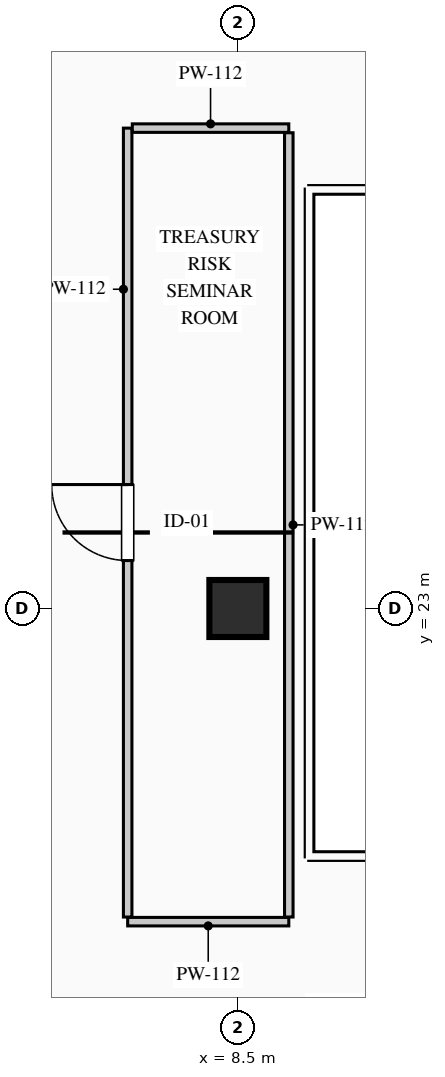
"""IFC4 building model, lengths in metres.
Left out: names, types, materials, properties, quantities, classifications, styles, units other than length and angle.
Written with IfcOpenShell. Run it as: python <this file> out.ifc"""

import sys

from ifc_helpers import new_model, si_unit, direction, frame, frame_2d, origin, origin_2d, place, context, subcontext, project, spatial, rectangle, extrude, element, fill, save


model = new_model("IFC4")
c1 = context("Model", 3, precision=1e-05, world=origin(), true_north=direction((0.0, 1.0)))
c2 = subcontext(c1, "Body", "Model", "MODEL_VIEW")
j1 = project(units=[si_unit("LENGTHUNIT", "METRE"), si_unit("PLANEANGLEUNIT", "RADIAN")], contexts=[c1])
p1 = place(None, origin())
s1 = spatial("IfcSite", under=j1, at=p1, CompositionType="ELEMENT")
p2 = place(p1, origin())
s2 = spatial("IfcBuilding", under=s1, at=p2, CompositionType="ELEMENT")
p3 = place(p2, frame((0.0, 0.0, 296.2)))
s3 = spatial("IfcBuildingStorey", under=s2, at=p3, CompositionType="ELEMENT", Elevation=296.2)
p4 = place(p3, frame((8.5, 23.0, 0.0), z_axis=(0.0, 0.0, 1.0), x_axis=(1.0, 0.0, 0.0)))
e1 = element("IfcColumn", 1, at=p4, inside=s3, PredefinedType="COLUMN", context=c2, shape_type="SweptSolid", body=[
    extrude(rectangle(XDim=0.75, YDim=0.75, at=origin_2d()), origin(), (0.0, 0.0, 1.0), 3.95),
])
p5 = place(p3, frame((9.17, 18.88, 0.0), z_axis=(0.0, 0.0, 1.0), x_axis=(-1.0, 0.0, 0.0)))
e2 = element("IfcWall", 2, at=p5, inside=s3, PredefinedType="PARTITIONING", context=c2, shape_type="SweptSolid", body=[
    extrude(rectangle(XDim=2.12, YDim=0.112, at=frame_2d((1.06, 0.0))), origin(), (0.0, 0.0, 1.0), 3.7),
])
p6 = place(p3, frame((7.05, 18.941, 0.0), z_axis=(0.0, 0.0, 1.0), x_axis=(0.0, 1.0, 0.0)))
e3 = element("IfcWall", 3, at=p6, inside=s3, PredefinedType="PARTITIONING", context=c2, shape_type="SweptSolid", body=[
    extrude(rectangle(XDim=10.379, YDim=0.112, at=frame_2d((5.189, 0.0))), origin(), (0.0, 0.0, 1.0), 3.7),
])
p7 = place(p6, frame((4.689, 0.0, 0.0)))
e4 = element("IfcOpeningElement", 4, at=p7, cuts=e3, PredefinedType="OPENING", context=c2, shape_type="SweptSolid", body=[
    extrude(rectangle(XDim=1.0, YDim=2.15, at=frame_2d((0.5, 1.075))), frame((0.0, 0.066, 0.0), z_axis=(0.0, -1.0, 0.0), x_axis=(1.0, 0.0, 0.0)), (0.0, 0.0, 1.0), 0.132),
])
p8 = place(p3, frame((7.111, 29.32, 0.0), z_axis=(0.0, 0.0, 1.0), x_axis=(1.0, 0.0, 0.0)))
e5 = element("IfcWall", 5, at=p8, inside=s3, PredefinedType="PARTITIONING", context=c2, shape_type="SweptSolid", body=[
    extrude(rectangle(XDim=2.059, YDim=0.112, at=frame_2d((1.029, 0.0))), origin(), (0.0, 0.0, 1.0), 3.7),
])
p9 = place(p3, frame((9.17, 29.259, 0.0), z_axis=(0.0, 0.0, 1.0), x_axis=(0.0, -1.0, 0.0)))
e6 = element("IfcWall", 6, at=p9, inside=s3, PredefinedType="PARTITIONING", context=c2, shape_type="SweptSolid", body=[
    extrude(rectangle(XDim=10.318, YDim=0.112, at=frame_2d((5.159, 0.0))), origin(), (0.0, 0.0, 1.0), 3.325),
])
p10 = place(p7, origin())
e7 = element("IfcDoor", 7, at=p10, inside=s3, OperationType="SINGLE_SWING_RIGHT", PredefinedType="DOOR", context=c2, shape_type="SweptSolid", body=[
    extrude(rectangle(XDim=1.0, YDim=2.15, at=frame_2d((0.5, 1.075))), frame((0.0, 0.025, 0.0), z_axis=(0.0, -1.0, 0.0), x_axis=(1.0, 0.0, 0.0)), (0.0, 0.0, 1.0), 0.05),
])
fill(e4, e7)
save(model, sys.argv[1])
